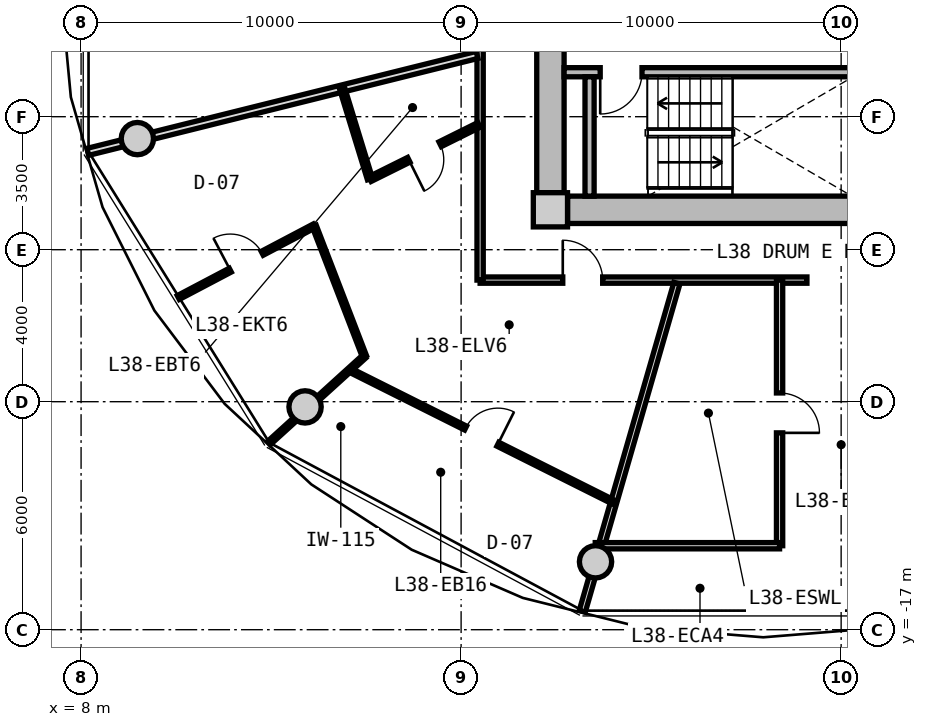
"""IFC4 building model, lengths in metres.
Left out: names, types, materials, properties, quantities, classifications, styles, units other than length and angle.
Written with IfcOpenShell. Run it as: python <this file> out.ifc"""

import sys

from ifc_helpers import new_model, si_unit, direction, frame, frame_2d, origin, origin_2d, place, context, subcontext, project, spatial, rectangle, circle, extrude, source, transform, mapped, element, fill, save


model = new_model("IFC4")
c1 = context("Model", 3, precision=1e-05, world=origin(), true_north=direction((0.0, 1.0)))
c2 = subcontext(c1, "Body", "Model", "MODEL_VIEW")
j1 = project(units=[si_unit("LENGTHUNIT", "METRE"), si_unit("PLANEANGLEUNIT", "RADIAN")], contexts=[c1])
p1 = place(None, origin())
s1 = spatial("IfcSite", under=j1, at=p1, CompositionType="ELEMENT")
p2 = place(p1, origin())
s2 = spatial("IfcBuilding", under=s1, at=p2, CompositionType="ELEMENT")
p3 = place(p2, frame((0.0, 0.0, 123.7)))
s3 = spatial("IfcBuildingStorey", under=s2, at=p3, CompositionType="ELEMENT", Elevation=123.7)
m1 = source(origin(), c2, "Body", "SweptSolid", [
    extrude(rectangle(XDim=0.9, YDim=0.9, at=origin_2d()), origin(), (0.0, 0.0, 1.0), 3.05),
])
p4 = place(p3, frame((20.35, -5.95, 0.0), z_axis=(0.0, 0.0, 1.0), x_axis=(1.0, 0.0, 0.0)))
e1 = element("IfcColumn", 1, at=p4, inside=s3, PredefinedType="COLUMN", context=c2, shape_type="MappedRepresentation", body=[
    mapped(m1, transform((0.0, 0.0, 0.0), x_axis=(1.0, 0.0, 0.0), y_axis=(0.0, 1.0, 0.0), z_axis=(0.0, 0.0, 1.0), scale=1.0)),
])
m2 = source(origin(), c2, "Body", "SweptSolid", [
    extrude(rectangle(XDim=14.4, YDim=0.72, at=frame_2d((7.2, 0.0))), origin(), (0.0, 0.0, 1.0), 2.79),
])
p5 = place(p3, frame((35.2, -5.95, 0.0), z_axis=(0.0, 0.0, 1.0), x_axis=(-1.0, 0.0, 0.0)))
e2 = element("IfcWall", 2, at=p5, inside=s3, PredefinedType="SHEAR", context=c2, shape_type="MappedRepresentation", body=[
    mapped(m2, transform((0.0, 0.0, 0.0), x_axis=(1.0, 0.0, 0.0), y_axis=(0.0, 1.0, 0.0), z_axis=(0.0, 0.0, 1.0), scale=1.0)),
])
m3 = source(origin(), c2, "Body", "SweptSolid", [
    extrude(rectangle(XDim=11.0, YDim=0.72, at=frame_2d((5.5, 0.0))), origin(), (0.0, 0.0, 1.0), 2.79),
])
p6 = place(p3, frame((20.35, -5.5, 0.0), z_axis=(0.0, 0.0, 1.0), x_axis=(0.0, 1.0, 0.0)))
e3 = element("IfcWall", 3, at=p6, inside=s3, PredefinedType="SHEAR", context=c2, shape_type="MappedRepresentation", body=[
    mapped(m3, transform((0.0, 0.0, 0.0), x_axis=(1.0, 0.0, 0.0), y_axis=(0.0, 1.0, 0.0), z_axis=(0.0, 0.0, 1.0), scale=1.0)),
])
p7 = place(p6, frame((3.8, 0.0, 0.0)))
e4 = element("IfcOpeningElement", 4, at=p7, cuts=e3, PredefinedType="OPENING", context=c2, shape_type="SweptSolid", body=[
    extrude(rectangle(XDim=1.2, YDim=2.15, at=frame_2d((0.6, 1.075))), frame((0.0, 0.37, 0.0), z_axis=(0.0, -1.0, 0.0), x_axis=(1.0, 0.0, 0.0)), (0.0, 0.0, 1.0), 0.74),
])
m4 = source(origin(), c2, "Body", "SweptSolid", [
    extrude(circle(Radius=0.425, at=origin_2d()), origin(), (0.0, 0.0, 1.0), 3.05),
])
for number, where, z_axis, x_axis in (
    (5, (9.481, -4.076, 0.0), (0.0, 0.0, 1.0), (1.0, 0.0, 0.0)),
    (6, (13.894, -11.137, 0.0), (0.0, 0.0, 1.0), (1.0, 0.0, 0.0)),
    (7, (21.537, -15.213, 0.0), (0.0, 0.0, 1.0), (1.0, 0.0, 0.0)),
):
    element("IfcColumn", number, at=place(p3, frame(where, z_axis=z_axis, x_axis=x_axis)), inside=s3, PredefinedType="COLUMN", context=c2, shape_type="MappedRepresentation", body=[
        mapped(m4, transform((0.0, 0.0, 0.0), x_axis=(1.0, 0.0, 0.0), y_axis=(0.0, 1.0, 0.0), z_axis=(0.0, 0.0, 1.0), scale=1.0)),
    ])
m5 = source(origin(), c2, "Body", "SweptSolid", [
    extrude(rectangle(XDim=7.83, YDim=0.24, at=frame_2d((3.915, 0.0))), origin(), (0.0, 0.0, 1.0), 2.79),
])
p8 = place(p3, frame((20.71, -2.33, 0.0), z_axis=(0.0, 0.0, 1.0), x_axis=(1.0, 0.0, 0.0)))
e8 = element("IfcWall", 8, at=p8, inside=s3, PredefinedType="PARTITIONING", context=c2, shape_type="MappedRepresentation", body=[
    mapped(m5, transform((0.0, 0.0, 0.0), x_axis=(1.0, 0.0, 0.0), y_axis=(0.0, 1.0, 0.0), z_axis=(0.0, 0.0, 1.0), scale=1.0)),
])
p9 = place(p8, frame((0.95, 0.0, 0.0)))
e9 = element("IfcOpeningElement", 9, at=p9, cuts=e8, PredefinedType="OPENING", context=c2, shape_type="SweptSolid", body=[
    extrude(rectangle(XDim=1.1, YDim=2.15, at=frame_2d((0.55, 1.075))), frame((0.0, 0.13, 0.0), z_axis=(0.0, -1.0, 0.0), x_axis=(1.0, 0.0, 0.0)), (0.0, 0.0, 1.0), 0.26),
])
m6 = source(origin(), c2, "Body", "SweptSolid", [
    extrude(rectangle(XDim=3.14, YDim=0.24, at=frame_2d((1.57, 0.0))), origin(), (0.0, 0.0, 1.0), 2.79),
])
p10 = place(p3, frame((21.38, -5.59, 0.0), z_axis=(0.0, 0.0, 1.0), x_axis=(0.0, 1.0, 0.0)))
e10 = element("IfcWall", 10, at=p10, inside=s3, PredefinedType="PARTITIONING", context=c2, shape_type="MappedRepresentation", body=[
    mapped(m6, transform((0.0, 0.0, 0.0), x_axis=(1.0, 0.0, 0.0), y_axis=(0.0, 1.0, 0.0), z_axis=(0.0, 0.0, 1.0), scale=1.0)),
])
m7 = source(origin(), c2, "Body", "SweptSolid", [
    extrude(rectangle(XDim=8.6, YDim=0.165, at=frame_2d((4.3, 0.0))), origin(), (0.0, 0.0, 1.0), 2.775),
])
p11 = place(p3, frame((27.1, -7.8, 0.0), z_axis=(0.0, 0.0, 1.0), x_axis=(-1.0, 0.0, 0.0)))
e11 = element("IfcWall", 11, at=p11, inside=s3, PredefinedType="PARTITIONING", context=c2, shape_type="MappedRepresentation", body=[
    mapped(m7, transform((0.0, 0.0, 0.0), x_axis=(1.0, 0.0, 0.0), y_axis=(0.0, 1.0, 0.0), z_axis=(0.0, 0.0, 1.0), scale=1.0)),
])
p12 = place(p11, frame((5.375, 0.0, 0.0)))
e12 = element("IfcOpeningElement", 12, at=p12, cuts=e11, PredefinedType="OPENING", context=c2, shape_type="SweptSolid", body=[
    extrude(rectangle(XDim=1.05, YDim=2.15, at=frame_2d((0.525, 1.075))), frame((0.0, 0.093, 0.0), z_axis=(0.0, -1.0, 0.0), x_axis=(1.0, 0.0, 0.0)), (0.0, 0.0, 1.0), 0.185),
])
m8 = source(origin(), c2, "Body", "SweptSolid", [
    extrude(rectangle(XDim=15.6, YDim=0.165, at=frame_2d((7.8, 0.0))), origin(), (0.0, 0.0, 1.0), 2.775),
])
p13 = place(p3, frame((18.5, -7.8, 0.0), z_axis=(0.0, 0.0, 1.0), x_axis=(0.0, 1.0, 0.0)))
e13 = element("IfcWall", 13, at=p13, inside=s3, PredefinedType="PARTITIONING", context=c2, shape_type="MappedRepresentation", body=[
    mapped(m8, transform((0.0, 0.0, 0.0), x_axis=(1.0, 0.0, 0.0), y_axis=(0.0, 1.0, 0.0), z_axis=(0.0, 0.0, 1.0), scale=1.0)),
])
p14 = place(p13, frame((10.383, 0.0, 0.0)))
e14 = element("IfcOpeningElement", 14, at=p14, cuts=e13, PredefinedType="OPENING", context=c2, shape_type="SweptSolid", body=[
    extrude(rectangle(XDim=1.05, YDim=2.15, at=frame_2d((0.525, 1.075))), frame((0.0, 0.093, 0.0), z_axis=(0.0, -1.0, 0.0), x_axis=(1.0, 0.0, 0.0)), (0.0, 0.0, 1.0), 0.185),
])
p15 = place(p13, frame((6.419, 0.0, 0.0)))
e15 = element("IfcOpeningElement", 15, at=p15, cuts=e13, PredefinedType="OPENING", context=c2, shape_type="SweptSolid", body=[
    extrude(rectangle(XDim=1.05, YDim=2.15, at=frame_2d((0.525, 1.075))), frame((0.0, 0.093, 0.0), z_axis=(0.0, -1.0, 0.0), x_axis=(1.0, 0.0, 0.0)), (0.0, 0.0, 1.0), 0.185),
])
m9 = source(origin(), c2, "Body", "SweptSolid", [
    extrude(rectangle(XDim=8.989, YDim=0.165, at=frame_2d((4.495, 0.0))), origin(), (0.0, 0.0, 1.0), 2.275),
])
p16 = place(p3, frame((23.678, -7.88, 0.0), z_axis=(0.0, 0.0, 1.0), x_axis=(-0.27702323008, -0.960863221274, 0.0)))
e16 = element("IfcWall", 16, at=p16, inside=s3, PredefinedType="PARTITIONING", context=c2, shape_type="MappedRepresentation", body=[
    mapped(m9, transform((0.0, 0.0, 0.0), x_axis=(1.0, 0.0, 0.0), y_axis=(0.0, 1.0, 0.0), z_axis=(0.0, 0.0, 1.0), scale=1.0)),
])
m10 = source(origin(), c2, "Body", "SweptSolid", [
    extrude(rectangle(XDim=6.99, YDim=0.165, at=frame_2d((3.495, 0.0))), origin(), (0.0, 0.0, 1.0), 2.775),
])
p17 = place(p3, frame((26.38, -14.79, 0.0), z_axis=(0.0, 0.0, 1.0), x_axis=(0.0, 1.0, 0.0)))
e17 = element("IfcWall", 17, at=p17, inside=s3, PredefinedType="PARTITIONING", context=c2, shape_type="MappedRepresentation", body=[
    mapped(m10, transform((0.0, 0.0, 0.0), x_axis=(1.0, 0.0, 0.0), y_axis=(0.0, 1.0, 0.0), z_axis=(0.0, 0.0, 1.0), scale=1.0)),
])
p18 = place(p17, frame((2.97, 0.0, 0.0)))
e18 = element("IfcOpeningElement", 18, at=p18, cuts=e17, PredefinedType="OPENING", context=c2, shape_type="SweptSolid", body=[
    extrude(rectangle(XDim=1.05, YDim=2.15, at=frame_2d((0.525, 1.075))), frame((0.0, 0.093, 0.0), z_axis=(0.0, -1.0, 0.0), x_axis=(1.0, 0.0, 0.0)), (0.0, 0.0, 1.0), 0.185),
])
m11 = source(origin(), c2, "Body", "SweptSolid", [
    extrude(rectangle(XDim=4.851, YDim=0.165, at=frame_2d((2.425, 0.0))), origin(), (0.0, 0.0, 1.0), 2.775),
])
p19 = place(p3, frame((21.529, -14.79, 0.0), z_axis=(0.0, 0.0, 1.0), x_axis=(1.0, 0.0, 0.0)))
e19 = element("IfcWall", 19, at=p19, inside=s3, PredefinedType="PARTITIONING", context=c2, shape_type="MappedRepresentation", body=[
    mapped(m11, transform((0.0, 0.0, 0.0), x_axis=(1.0, 0.0, 0.0), y_axis=(0.0, 1.0, 0.0), z_axis=(0.0, 0.0, 1.0), scale=1.0)),
])
m12 = source(origin(), c2, "Body", "SweptSolid", [
    extrude(rectangle(XDim=10.556, YDim=0.19, at=frame_2d((5.278, 0.0))), origin(), (0.0, 0.0, 1.0), 2.275),
])
p20 = place(p3, frame((18.42, -1.875, 0.0), z_axis=(0.0, 0.0, 1.0), x_axis=(-0.970363857851, -0.241648470667, 0.0)))
e20 = element("IfcWall", 20, at=p20, inside=s3, PredefinedType="PARTITIONING", context=c2, shape_type="MappedRepresentation", body=[
    mapped(m12, transform((0.0, 0.0, 0.0), x_axis=(1.0, 0.0, 0.0), y_axis=(0.0, 1.0, 0.0), z_axis=(0.0, 0.0, 1.0), scale=1.0)),
])
m13 = source(origin(), c2, "Body", "SweptSolid", [
    extrude(rectangle(XDim=7.767, YDim=0.115, at=frame_2d((3.884, 0.0))), origin(), (0.0, 0.0, 1.0), 2.775),
])
p21 = place(p3, frame((15.07, -10.167, 0.0), z_axis=(0.0, 0.0, 1.0), x_axis=(0.894188177352, -0.447691303783, 0.0)))
e21 = element("IfcWall", 21, at=p21, inside=s3, PredefinedType="PARTITIONING", context=c2, shape_type="MappedRepresentation", body=[
    mapped(m13, transform((0.0, 0.0, 0.0), x_axis=(1.0, 0.0, 0.0), y_axis=(0.0, 1.0, 0.0), z_axis=(0.0, 0.0, 1.0), scale=1.0)),
])
p22 = place(p21, frame((3.409, 0.0, 0.0)))
e22 = element("IfcOpeningElement", 22, at=p22, cuts=e21, PredefinedType="OPENING", context=c2, shape_type="SweptSolid", body=[
    extrude(rectangle(XDim=0.95, YDim=2.1, at=frame_2d((0.475, 1.05))), frame((0.0, 0.067, 0.0), z_axis=(0.0, -1.0, 0.0), x_axis=(1.0, 0.0, 0.0)), (0.0, 0.0, 1.0), 0.135),
])
m14 = source(origin(), c2, "Body", "SweptSolid", [
    extrude(rectangle(XDim=3.393, YDim=0.115, at=frame_2d((1.696, 0.0))), origin(), (0.0, 0.0, 1.0), 2.275),
])
p23 = place(p3, frame((15.451, -9.811, 0.0), z_axis=(0.0, 0.0, 1.0), x_axis=(-0.740356690907, -0.672214229416, 0.0)))
e23 = element("IfcWall", 23, at=p23, inside=s3, PredefinedType="PARTITIONING", context=c2, shape_type="MappedRepresentation", body=[
    mapped(m14, transform((0.0, 0.0, 0.0), x_axis=(1.0, 0.0, 0.0), y_axis=(0.0, 1.0, 0.0), z_axis=(0.0, 0.0, 1.0), scale=1.0)),
])
m15 = source(origin(), c2, "Body", "SweptSolid", [
    extrude(rectangle(XDim=3.203, YDim=0.14, at=frame_2d((1.601, 0.0))), origin(), (0.0, 0.0, 1.0), 2.775),
])
p24 = place(p3, frame((18.47, -3.717, 0.0), z_axis=(0.0, 0.0, 1.0), x_axis=(-0.895552551978, -0.444955758077, 0.0)))
e24 = element("IfcWall", 24, at=p24, inside=s3, PredefinedType="PARTITIONING", context=c2, shape_type="MappedRepresentation", body=[
    mapped(m15, transform((0.0, 0.0, 0.0), x_axis=(1.0, 0.0, 0.0), y_axis=(0.0, 1.0, 0.0), z_axis=(0.0, 0.0, 1.0), scale=1.0)),
])
p25 = place(p24, frame((1.141, 0.0, 0.0)))
e25 = element("IfcOpeningElement", 25, at=p25, cuts=e24, PredefinedType="OPENING", context=c2, shape_type="SweptSolid", body=[
    extrude(rectangle(XDim=0.92, YDim=2.1, at=frame_2d((0.46, 1.05))), frame((0.0, 0.08, 0.0), z_axis=(0.0, -1.0, 0.0), x_axis=(1.0, 0.0, 0.0)), (0.0, 0.0, 1.0), 0.16),
])
m16 = source(origin(), c2, "Body", "SweptSolid", [
    extrude(rectangle(XDim=2.478, YDim=0.14, at=frame_2d((1.239, 0.0))), origin(), (0.0, 0.0, 1.0), 2.775),
])
p26 = place(p3, frame((15.602, -5.142, 0.0), z_axis=(0.0, 0.0, 1.0), x_axis=(-0.293372504398, 0.955998207981, 0.0)))
e26 = element("IfcWall", 26, at=p26, inside=s3, PredefinedType="PARTITIONING", context=c2, shape_type="MappedRepresentation", body=[
    mapped(m16, transform((0.0, 0.0, 0.0), x_axis=(1.0, 0.0, 0.0), y_axis=(0.0, 1.0, 0.0), z_axis=(0.0, 0.0, 1.0), scale=1.0)),
])
m17 = source(origin(), c2, "Body", "SweptSolid", [
    extrude(rectangle(XDim=4.042, YDim=0.115, at=frame_2d((2.021, 0.0))), origin(), (0.0, 0.0, 1.0), 2.775),
])
p27 = place(p3, frame((14.134, -6.375, 0.0), z_axis=(0.0, 0.0, 1.0), x_axis=(-0.88476748851, -0.466032714812, 0.0)))
e27 = element("IfcWall", 27, at=p27, inside=s3, PredefinedType="PARTITIONING", context=c2, shape_type="MappedRepresentation", body=[
    mapped(m17, transform((0.0, 0.0, 0.0), x_axis=(1.0, 0.0, 0.0), y_axis=(0.0, 1.0, 0.0), z_axis=(0.0, 0.0, 1.0), scale=1.0)),
])
p28 = place(p27, frame((1.546, 0.0, 0.0)))
e28 = element("IfcOpeningElement", 28, at=p28, cuts=e27, PredefinedType="OPENING", context=c2, shape_type="SweptSolid", body=[
    extrude(rectangle(XDim=0.95, YDim=2.1, at=frame_2d((0.475, 1.05))), frame((0.0, 0.067, 0.0), z_axis=(0.0, -1.0, 0.0), x_axis=(1.0, 0.0, 0.0)), (0.0, 0.0, 1.0), 0.135),
])
m18 = source(origin(), c2, "Body", "SweptSolid", [
    extrude(rectangle(XDim=3.677, YDim=0.115, at=frame_2d((1.838, 0.0))), origin(), (0.0, 0.0, 1.0), 2.775),
])
p29 = place(p3, frame((14.134, -6.375, 0.0), z_axis=(0.0, 0.0, 1.0), x_axis=(0.359592980271, -0.933109258629, 0.0)))
e29 = element("IfcWall", 29, at=p29, inside=s3, PredefinedType="PARTITIONING", context=c2, shape_type="MappedRepresentation", body=[
    mapped(m18, transform((0.0, 0.0, 0.0), x_axis=(1.0, 0.0, 0.0), y_axis=(0.0, 1.0, 0.0), z_axis=(0.0, 0.0, 1.0), scale=1.0)),
])
m19 = source(origin(), c2, "Body", "SweptSolid", [
    extrude(rectangle(XDim=1.1, YDim=2.15, at=frame_2d((0.55, 1.075))), frame((0.0, 0.025, 0.0), z_axis=(0.0, -1.0, 0.0), x_axis=(1.0, 0.0, 0.0)), (0.0, 0.0, 1.0), 0.05),
])
p30 = place(p9, frame((1.1, 0.0, 0.0), z_axis=(0.0, 0.0, 1.0), x_axis=(-1.0, 0.0, 0.0)))
e30 = element("IfcDoor", 30, at=p30, inside=s3, OperationType="SINGLE_SWING_RIGHT", PredefinedType="DOOR", context=c2, shape_type="MappedRepresentation", body=[
    mapped(m19, transform((0.0, 0.0, 0.0), x_axis=(1.0, 0.0, 0.0), y_axis=(0.0, 1.0, 0.0), z_axis=(0.0, 0.0, 1.0), scale=1.0)),
])
fill(e9, e30)
m20 = source(origin(), c2, "Body", "SweptSolid", [
    extrude(rectangle(XDim=1.05, YDim=2.15, at=frame_2d((0.525, 1.075))), frame((0.0, 0.025, 0.0), z_axis=(0.0, -1.0, 0.0), x_axis=(1.0, 0.0, 0.0)), (0.0, 0.0, 1.0), 0.05),
])
p31 = place(p18, frame((1.05, 0.0, 0.0), z_axis=(0.0, 0.0, 1.0), x_axis=(-1.0, 0.0, 0.0)))
e31 = element("IfcDoor", 31, at=p31, inside=s3, OperationType="SINGLE_SWING_RIGHT", PredefinedType="DOOR", context=c2, shape_type="MappedRepresentation", body=[
    mapped(m20, transform((0.0, 0.0, 0.0), x_axis=(1.0, 0.0, 0.0), y_axis=(0.0, 1.0, 0.0), z_axis=(0.0, 0.0, 1.0), scale=1.0)),
])
fill(e18, e31)
p32 = place(p12, frame((1.05, 0.0, 0.0), z_axis=(0.0, 0.0, 1.0), x_axis=(-1.0, 0.0, 0.0)))
e32 = element("IfcDoor", 32, at=p32, inside=s3, OperationType="SINGLE_SWING_LEFT", PredefinedType="DOOR", context=c2, shape_type="MappedRepresentation", body=[
    mapped(m20, transform((0.0, 0.0, 0.0), x_axis=(1.0, 0.0, 0.0), y_axis=(0.0, 1.0, 0.0), z_axis=(0.0, 0.0, 1.0), scale=1.0)),
])
fill(e12, e32)
m21 = source(origin(), c2, "Body", "SweptSolid", [
    extrude(rectangle(XDim=0.92, YDim=2.1, at=frame_2d((0.46, 1.05))), frame((0.0, 0.025, 0.0), z_axis=(0.0, -1.0, 0.0), x_axis=(1.0, 0.0, 0.0)), (0.0, 0.0, 1.0), 0.05),
])
p33 = place(p25, origin())
e33 = element("IfcDoor", 33, at=p33, inside=s3, OperationType="SINGLE_SWING_RIGHT", PredefinedType="DOOR", context=c2, shape_type="MappedRepresentation", body=[
    mapped(m21, transform((0.0, 0.0, 0.0), x_axis=(1.0, 0.0, 0.0), y_axis=(0.0, 1.0, 0.0), z_axis=(0.0, 0.0, 1.0), scale=1.0)),
])
fill(e25, e33)
m22 = source(origin(), c2, "Body", "SweptSolid", [
    extrude(rectangle(XDim=0.95, YDim=2.1, at=frame_2d((0.475, 1.05))), frame((0.0, 0.025, 0.0), z_axis=(0.0, -1.0, 0.0), x_axis=(1.0, 0.0, 0.0)), (0.0, 0.0, 1.0), 0.05),
])
p34 = place(p28, frame((0.95, 0.0, 0.0), z_axis=(0.0, 0.0, 1.0), x_axis=(-1.0, 0.0, 0.0)))
e34 = element("IfcDoor", 34, at=p34, inside=s3, OperationType="SINGLE_SWING_LEFT", PredefinedType="DOOR", context=c2, shape_type="MappedRepresentation", body=[
    mapped(m22, transform((0.0, 0.0, 0.0), x_axis=(1.0, 0.0, 0.0), y_axis=(0.0, 1.0, 0.0), z_axis=(0.0, 0.0, 1.0), scale=1.0)),
])
fill(e28, e34)
p35 = place(p22, origin())
e35 = element("IfcDoor", 35, at=p35, inside=s3, OperationType="SINGLE_SWING_RIGHT", PredefinedType="DOOR", context=c2, shape_type="MappedRepresentation", body=[
    mapped(m22, transform((0.0, 0.0, 0.0), x_axis=(1.0, 0.0, 0.0), y_axis=(0.0, 1.0, 0.0), z_axis=(0.0, 0.0, 1.0), scale=1.0)),
])
fill(e22, e35)
save(model, sys.argv[1])
